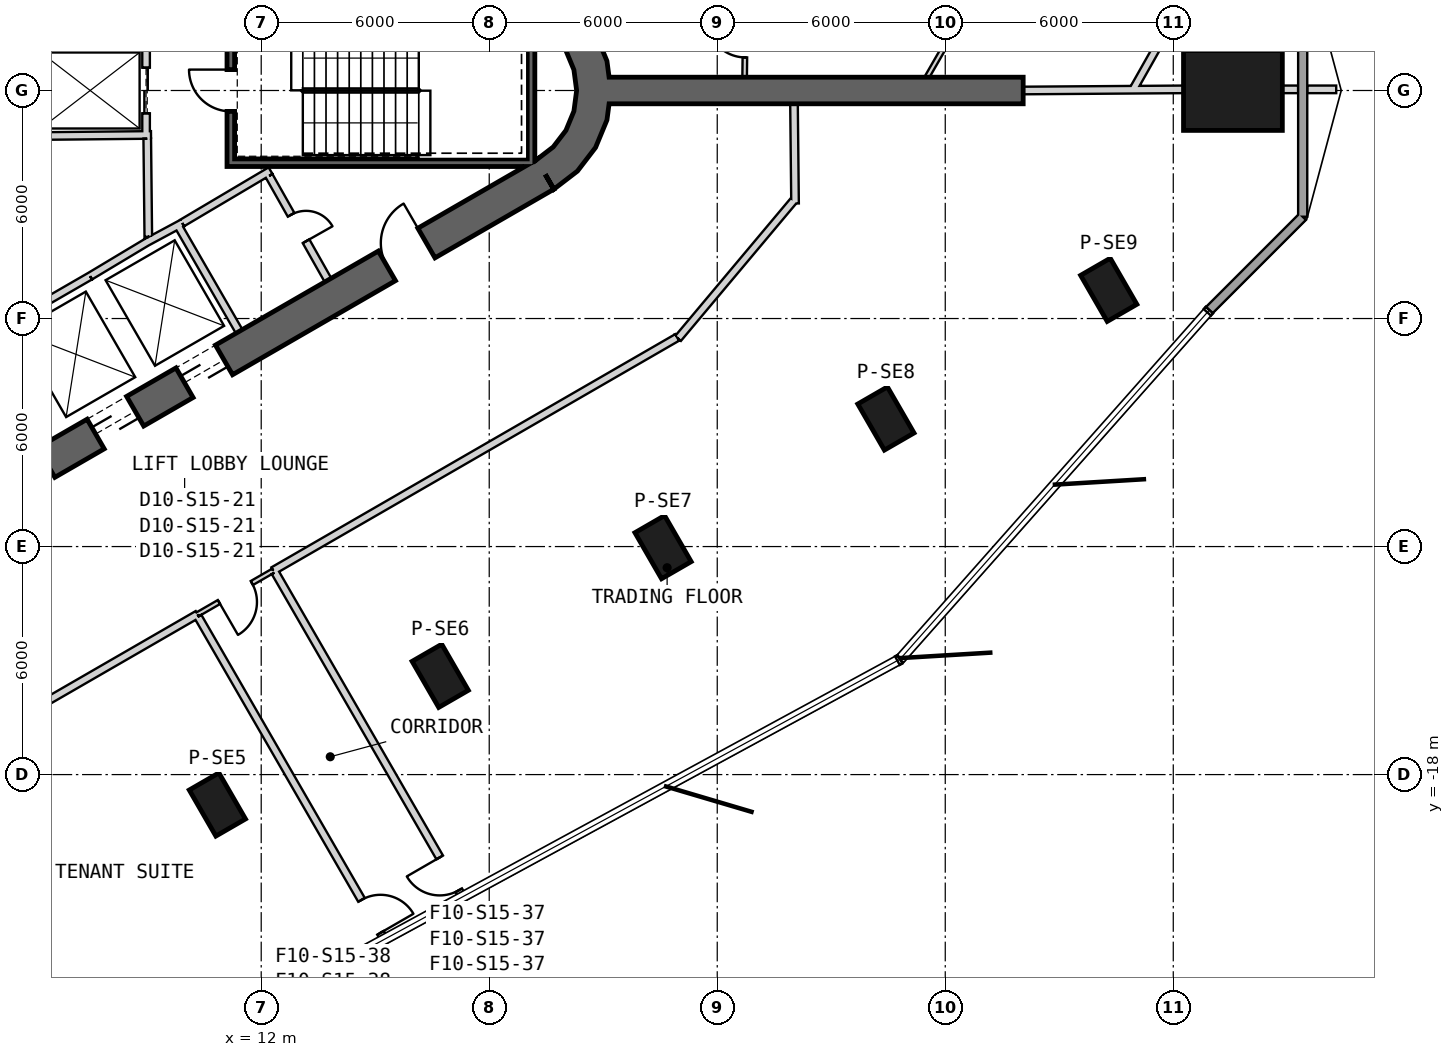
"""IFC4 building model, lengths in metres.
Left out: names, types, materials, properties, quantities, classifications, styles, units other than length and angle.
Written with IfcOpenShell. Run it as: python <this file> out.ifc"""

import sys

from ifc_helpers import new_model, si_unit, direction, frame, frame_2d, origin, origin_2d, place, context, subcontext, project, spatial, polyline, rectangle, outline, extrude, element, fill, save


model = new_model("IFC4")
c1 = context("Model", 3, precision=1e-05, world=origin(), true_north=direction((0.0, 1.0)))
c2 = subcontext(c1, "Body", "Model", "MODEL_VIEW")
j1 = project(units=[si_unit("LENGTHUNIT", "METRE"), si_unit("PLANEANGLEUNIT", "RADIAN")], contexts=[c1])
p1 = place(None, origin())
s1 = spatial("IfcSite", under=j1, at=p1, CompositionType="ELEMENT")
p2 = place(p1, origin())
s2 = spatial("IfcBuilding", under=s1, at=p2, CompositionType="ELEMENT")
p3 = place(p2, frame((0.0, 0.0, 241.2)))
s3 = spatial("IfcBuildingStorey", under=s2, at=p3, CompositionType="ELEMENT", Elevation=241.2)
p4 = place(p3, frame((37.57, 0.0, 0.0), z_axis=(0.0, 0.0, 1.0), x_axis=(1.0, 0.0, 0.0)))
e1 = element("IfcColumn", 1, at=p4, inside=s3, PredefinedType="COLUMN", context=c2, shape_type="SweptSolid", body=[
    extrude(rectangle(XDim=2.6, YDim=2.1, at=origin_2d()), origin(), (0.0, 0.0, 1.0), 4.0),
])
for number, where, z_axis, x_axis in (
    (2, (10.847, -18.787, 0.0), (0.0, 0.0, 1.0), (0.5, -0.866, 0.0)),
    (3, (16.71, -15.401, 0.0), (0.0, 0.0, 1.0), (0.5, -0.866, 0.0)),
    (4, (22.574, -12.016, 0.0), (0.0, 0.0, 1.0), (0.5, -0.866, 0.0)),
    (5, (28.438, -8.631, 0.0), (0.0, 0.0, 1.0), (0.5, -0.866, 0.0)),
    (6, (34.302, -5.245, 0.0), (0.0, 0.0, 1.0), (0.5, -0.866, 0.0)),
):
    element("IfcColumn", number, at=place(p3, frame(where, z_axis=z_axis, x_axis=x_axis)), inside=s3, PredefinedType="COLUMN", context=c2, shape_type="SweptSolid", body=[
        extrude(rectangle(XDim=1.4, YDim=0.9, at=origin_2d()), origin(), (0.0, 0.0, 1.0), 4.0),
    ])
p5 = place(p3, frame((-7.825, -17.97, 0.0), z_axis=(0.0, 0.0, 1.0), x_axis=(0.866028369851, 0.499994862586, 0.0)))
e7 = element("IfcWall", 7, at=p5, inside=s3, PredefinedType="SHEAR", context=c2, shape_type="SweptSolid", body=[
    extrude(rectangle(XDim=31.523, YDim=0.9, at=frame_2d((15.762, 0.0))), origin(), (0.0, 0.0, 1.0), 4.0),
])
p6 = place(p5, frame((7.062, 0.0, 0.0)))
e8 = element("IfcOpeningElement", 8, at=p6, cuts=e7, PredefinedType="OPENING", context=c2, shape_type="SweptSolid", body=[
    extrude(rectangle(XDim=1.2, YDim=2.4, at=frame_2d((0.6, 1.2))), frame((0.0, 0.46, 0.0), z_axis=(0.0, -1.0, 0.0), x_axis=(1.0, 0.0, 0.0)), (0.0, 0.0, 1.0), 0.92),
])
p7 = place(p5, frame((9.762, 0.0, 0.0)))
e9 = element("IfcOpeningElement", 9, at=p7, cuts=e7, PredefinedType="OPENING", context=c2, shape_type="SweptSolid", body=[
    extrude(rectangle(XDim=1.2, YDim=2.4, at=frame_2d((0.6, 1.2))), frame((0.0, 0.46, 0.0), z_axis=(0.0, -1.0, 0.0), x_axis=(1.0, 0.0, 0.0)), (0.0, 0.0, 1.0), 0.92),
])
p8 = place(p5, frame((12.462, 0.0, 0.0)))
e10 = element("IfcOpeningElement", 10, at=p8, cuts=e7, PredefinedType="OPENING", context=c2, shape_type="SweptSolid", body=[
    extrude(rectangle(XDim=1.2, YDim=2.4, at=frame_2d((0.6, 1.2))), frame((0.0, 0.46, 0.0), z_axis=(0.0, -1.0, 0.0), x_axis=(1.0, 0.0, 0.0)), (0.0, 0.0, 1.0), 0.92),
])
p9 = place(p5, frame((15.162, 0.0, 0.0)))
e11 = element("IfcOpeningElement", 11, at=p9, cuts=e7, PredefinedType="OPENING", context=c2, shape_type="SweptSolid", body=[
    extrude(rectangle(XDim=1.2, YDim=2.4, at=frame_2d((0.6, 1.2))), frame((0.0, 0.46, 0.0), z_axis=(0.0, -1.0, 0.0), x_axis=(1.0, 0.0, 0.0)), (0.0, 0.0, 1.0), 0.92),
])
p10 = place(p5, frame((17.862, 0.0, 0.0)))
e12 = element("IfcOpeningElement", 12, at=p10, cuts=e7, PredefinedType="OPENING", context=c2, shape_type="SweptSolid", body=[
    extrude(rectangle(XDim=1.2, YDim=2.4, at=frame_2d((0.6, 1.2))), frame((0.0, 0.46, 0.0), z_axis=(0.0, -1.0, 0.0), x_axis=(1.0, 0.0, 0.0)), (0.0, 0.0, 1.0), 0.92),
])
p11 = place(p5, frame((20.562, 0.0, 0.0)))
e13 = element("IfcOpeningElement", 13, at=p11, cuts=e7, PredefinedType="OPENING", context=c2, shape_type="SweptSolid", body=[
    extrude(rectangle(XDim=1.2, YDim=2.4, at=frame_2d((0.6, 1.2))), frame((0.0, 0.46, 0.0), z_axis=(0.0, -1.0, 0.0), x_axis=(1.0, 0.0, 0.0)), (0.0, 0.0, 1.0), 0.92),
])
p12 = place(p5, frame((26.712, 0.0, 0.0)))
e14 = element("IfcOpeningElement", 14, at=p12, cuts=e7, PredefinedType="OPENING", context=c2, shape_type="SweptSolid", body=[
    extrude(rectangle(XDim=1.2, YDim=2.4, at=frame_2d((0.6, 1.2))), frame((0.0, 0.46, 0.0), z_axis=(0.0, -1.0, 0.0), x_axis=(1.0, 0.0, 0.0)), (0.0, 0.0, 1.0), 0.92),
])
p13 = place(p5, frame((3.612, 0.0, 0.0)))
e15 = element("IfcOpeningElement", 15, at=p13, cuts=e7, PredefinedType="OPENING", context=c2, shape_type="SweptSolid", body=[
    extrude(rectangle(XDim=1.2, YDim=2.4, at=frame_2d((0.6, 1.2))), frame((0.0, 0.46, 0.0), z_axis=(0.0, -1.0, 0.0), x_axis=(1.0, 0.0, 0.0)), (0.0, 0.0, 1.0), 0.92),
])
p14 = place(p3, origin())
e16 = element("IfcWall", 16, at=p14, inside=s3, PredefinedType="SHEAR", context=c2, shape_type="SweptSolid", body=[
    extrude(outline(polyline([(19.7, -2.598), (20.321, -2.121), (20.798, -1.5), (21.098, -0.777), (21.2, 0.0), (21.098, 0.777), (20.798, 1.5), (20.321, 2.121), (19.7, 2.598), (19.25, 1.819), (19.685, 1.485), (20.019, 1.05), (20.229, 0.543), (20.3, 0.0), (20.229, -0.543), (20.019, -1.05), (19.685, -1.485), (19.25, -1.819), (19.7, -2.598)])), origin(), (0.0, 0.0, 1.0), 4.0),
])
p15 = place(p3, frame((21.15, 0.0, 0.0), z_axis=(0.0, 0.0, 1.0), x_axis=(1.0, 0.0, 0.0)))
e17 = element("IfcWall", 17, at=p15, inside=s3, PredefinedType="SHEAR", context=c2, shape_type="SweptSolid", body=[
    extrude(rectangle(XDim=10.9, YDim=0.7, at=frame_2d((5.45, 0.0))), origin(), (0.0, 0.0, 1.0), 4.0),
])
p16 = place(p3, frame((36.949, -5.778, 0.0), z_axis=(0.0, 0.0, 1.0), x_axis=(0.707141916054, 0.707071644573, 0.0)))
e18 = element("IfcWall", 18, at=p16, inside=s3, PredefinedType="SOLIDWALL", context=c2, shape_type="SweptSolid", body=[
    extrude(rectangle(XDim=3.474, YDim=0.24, at=frame_2d((1.737, 0.0))), origin(), (0.0, 0.0, 1.0), 3.7),
])
p17 = place(p3, frame((39.406, -3.321, 0.0), z_axis=(0.0, 0.0, 1.0), x_axis=(0.0, 1.0, 0.0)))
e19 = element("IfcWall", 19, at=p17, inside=s3, PredefinedType="SOLIDWALL", context=c2, shape_type="SweptSolid", body=[
    extrude(rectangle(XDim=6.643, YDim=0.24, at=frame_2d((3.321, 0.0))), origin(), (0.0, 0.0, 1.0), 3.7),
])
p18 = place(p3, frame((0.483, -8.936, 0.0), z_axis=(0.0, 0.0, 1.0), x_axis=(0.866030989016, 0.499990325971, 0.0)))
e20 = element("IfcWall", 20, at=p18, inside=s3, PredefinedType="PLUMBINGWALL", context=c2, shape_type="SweptSolid", body=[
    extrude(rectangle(XDim=8.1, YDim=0.2, at=frame_2d((4.05, 0.0))), origin(), (0.0, 0.0, 1.0), 3.7),
])
p19 = place(p3, frame((9.795, -3.525, 0.0), z_axis=(0.0, 0.0, 1.0), x_axis=(0.499984717929, -0.866034226713, 0.0)))
e21 = element("IfcWall", 21, at=p19, inside=s3, PredefinedType="PLUMBINGWALL", context=c2, shape_type="SweptSolid", body=[
    extrude(rectangle(XDim=3.25, YDim=0.2, at=frame_2d((1.625, 0.0))), origin(), (0.0, 0.0, 1.0), 3.7),
])
p20 = place(p3, frame((8.974, -3.999, 0.0), z_axis=(0.0, 0.0, 1.0), x_axis=(0.880907015104, 0.473289373154, 0.0)))
e22 = element("IfcWall", 22, at=p20, inside=s3, PredefinedType="PLUMBINGWALL", context=c2, shape_type="SweptSolid", body=[
    extrude(rectangle(XDim=1.078, YDim=0.2, at=frame_2d((0.539, 0.0))), origin(), (0.0, 0.0, 1.0), 3.7),
])
p21 = place(p3, frame((7.497, -4.886, 0.0), z_axis=(0.0, 0.0, 1.0), x_axis=(0.857516281273, 0.51445682749, 0.0)))
e23 = element("IfcWall", 23, at=p21, inside=s3, PredefinedType="PLUMBINGWALL", context=c2, shape_type="SweptSolid", body=[
    extrude(rectangle(XDim=1.845, YDim=0.2, at=frame_2d((0.922, 0.0))), origin(), (0.0, 0.0, 1.0), 3.7),
])
p22 = place(p3, frame((19.1, -2.0, -0.3), z_axis=(0.0, 0.0, 1.0), x_axis=(0.0, 1.0, 0.0)))
e24 = element("IfcWall", 24, at=p22, inside=s3, PredefinedType="SHEAR", context=c2, shape_type="SweptSolid", body=[
    extrude(rectangle(XDim=3.8, YDim=0.2, at=frame_2d((1.9, 0.0))), origin(), (0.0, 0.0, 1.0), 4.0),
])
p23 = place(p3, frame((11.1, -1.9, -0.3), z_axis=(0.0, 0.0, 1.0), x_axis=(1.0, 0.0, 0.0)))
e25 = element("IfcWall", 25, at=p23, inside=s3, PredefinedType="SHEAR", context=c2, shape_type="SweptSolid", body=[
    extrude(rectangle(XDim=7.9, YDim=0.2, at=frame_2d((3.95, 0.0))), origin(), (0.0, 0.0, 1.0), 4.0),
])
p24 = place(p3, frame((11.2, -1.8, -0.3), z_axis=(0.0, 0.0, 1.0), x_axis=(0.0, 1.0, 0.0)))
e26 = element("IfcWall", 26, at=p24, inside=s3, PredefinedType="SHEAR", context=c2, shape_type="SweptSolid", body=[
    extrude(rectangle(XDim=3.6, YDim=0.2, at=frame_2d((1.8, 0.0))), origin(), (0.0, 0.0, 1.0), 4.0),
])
p25 = place(p24, frame((1.25, 0.0, 0.3)))
e27 = element("IfcOpeningElement", 27, at=p25, cuts=e26, PredefinedType="OPENING", context=c2, shape_type="SweptSolid", body=[
    extrude(rectangle(XDim=1.1, YDim=2.1, at=frame_2d((0.55, 1.05))), frame((0.0, 0.11, 0.0), z_axis=(0.0, -1.0, 0.0), x_axis=(1.0, 0.0, 0.0)), (0.0, 0.0, 1.0), 0.22),
])
p26 = place(p3, frame((8.97, 1.2, 0.0), z_axis=(0.0, 0.0, 1.0), x_axis=(0.0, -1.0, 0.0)))
e28 = element("IfcWall", 28, at=p26, inside=s3, PredefinedType="PLUMBINGWALL", context=c2, shape_type="SweptSolid", body=[
    extrude(rectangle(XDim=2.4, YDim=0.2, at=frame_2d((1.2, 0.0))), origin(), (0.0, 0.0, 1.0), 3.7),
])
p27 = place(p26, frame((0.6, 0.0, 0.0)))
e29 = element("IfcOpeningElement", 29, at=p27, cuts=e28, PredefinedType="OPENING", context=c2, shape_type="SweptSolid", body=[
    extrude(rectangle(XDim=1.2, YDim=2.4, at=frame_2d((0.6, 1.2))), frame((0.0, 0.11, 0.0), z_axis=(0.0, -1.0, 0.0), x_axis=(1.0, 0.0, 0.0)), (0.0, 0.0, 1.0), 0.22),
])
p28 = place(p3, frame((9.1, -1.169, 0.0), z_axis=(0.0, 0.0, 1.0), x_axis=(-0.999949988, -0.010001074852, 0.0)))
e30 = element("IfcWall", 30, at=p28, inside=s3, PredefinedType="PLUMBINGWALL", context=c2, shape_type="SweptSolid", body=[
    extrude(rectangle(XDim=3.1, YDim=0.2, at=frame_2d((1.55, 0.0))), origin(), (0.0, 0.0, 1.0), 3.7),
])
p29 = place(p3, frame((12.245, -2.109, 0.0), z_axis=(0.0, 0.0, 1.0), x_axis=(-0.860414880418, -0.509594185166, 0.0)))
e31 = element("IfcWall", 31, at=p29, inside=s3, PredefinedType="PARTITIONING", context=c2, shape_type="SweptSolid", body=[
    extrude(rectangle(XDim=2.7, YDim=0.2, at=frame_2d((1.35, 0.0))), origin(), (0.0, 0.0, 1.0), 3.7),
])
p30 = place(p3, frame((13.758, -4.99, 0.0), z_axis=(0.0, 0.0, 1.0), x_axis=(-0.491993409184, 0.87059892334, 0.0)))
e32 = element("IfcWall", 32, at=p30, inside=s3, PredefinedType="PARTITIONING", context=c2, shape_type="SweptSolid", body=[
    extrude(rectangle(XDim=3.15, YDim=0.2, at=frame_2d((1.575, 0.0))), origin(), (0.0, 0.0, 1.0), 3.7),
])
p31 = place(p30, frame((1.175, 0.0, 0.0)))
e33 = element("IfcOpeningElement", 33, at=p31, cuts=e32, PredefinedType="OPENING", context=c2, shape_type="SweptSolid", body=[
    extrude(rectangle(XDim=0.8, YDim=2.1, at=frame_2d((0.4, 1.05))), frame((0.0, 0.11, 0.0), z_axis=(0.0, -1.0, 0.0), x_axis=(1.0, 0.0, 0.0)), (0.0, 0.0, 1.0), 0.22),
])
p32 = place(p3, frame((9.029, -3.851, 0.0), z_axis=(0.0, 0.0, 1.0), x_axis=(-0.010784614026, 0.999941844359, 0.0)))
e34 = element("IfcWall", 34, at=p32, inside=s3, PredefinedType="PARTITIONING", context=c2, shape_type="SweptSolid", body=[
    extrude(rectangle(XDim=2.581, YDim=0.2, at=frame_2d((1.291, 0.0))), origin(), (0.0, 0.0, 1.0), 3.7),
])
p33 = place(p3, frame((24.721, 0.35, 0.0), z_axis=(0.0, 0.0, 1.0), x_axis=(0.012579203405, 0.999920878691, 0.0)))
e35 = element("IfcWall", 35, at=p33, inside=s3, PredefinedType="PARTITIONING", context=c2, shape_type="SweptSolid", body=[
    extrude(rectangle(XDim=1.941, YDim=0.12, at=frame_2d((0.97, 0.0))), origin(), (0.0, 0.0, 1.0), 3.7),
])
p34 = place(p33, frame((0.521, 0.0, 0.0)))
e36 = element("IfcOpeningElement", 36, at=p34, cuts=e35, PredefinedType="OPENING", context=c2, shape_type="SweptSolid", body=[
    extrude(rectangle(XDim=1.0, YDim=2.1, at=frame_2d((0.5, 1.05))), frame((0.0, 0.07, 0.0), z_axis=(0.0, -1.0, 0.0), x_axis=(1.0, 0.0, 0.0)), (0.0, 0.0, 1.0), 0.14),
])
p35 = place(p3, frame((12.317, -12.634, 0.0), z_axis=(0.0, 0.0, 1.0), x_axis=(-0.86602648383, -0.499998129301, 0.0)))
e37 = element("IfcWall", 37, at=p35, inside=s3, PredefinedType="PARTITIONING", context=c2, shape_type="SweptSolid", body=[
    extrude(rectangle(XDim=2.3, YDim=0.12, at=frame_2d((1.15, 0.0))), origin(), (0.0, 0.0, 1.0), 3.7),
])
p36 = place(p35, frame((0.65, 0.0, 0.0)))
e38 = element("IfcOpeningElement", 38, at=p36, cuts=e37, PredefinedType="OPENING", context=c2, shape_type="SweptSolid", body=[
    extrude(rectangle(XDim=1.0, YDim=2.1, at=frame_2d((0.5, 1.05))), frame((0.0, 0.07, 0.0), z_axis=(0.0, -1.0, 0.0), x_axis=(1.0, 0.0, 0.0)), (0.0, 0.0, 1.0), 0.14),
])
p37 = place(p3, frame((26.047, -2.972, 0.0), z_axis=(0.0, 0.0, 1.0), x_axis=(-0.010519853563, 0.99994466481, 0.0)))
e39 = element("IfcWall", 39, at=p37, inside=s3, PredefinedType="PARTITIONING", context=c2, shape_type="SweptSolid", body=[
    extrude(rectangle(XDim=2.623, YDim=0.2, at=frame_2d((1.311, 0.0))), origin(), (0.0, 0.0, 1.0), 3.7),
])
p38 = place(p3, frame((22.968, -6.524, 0.0), z_axis=(0.0, 0.0, 1.0), x_axis=(0.642764400317, 0.766063917493, 0.0)))
e40 = element("IfcWall", 40, at=p38, inside=s3, PredefinedType="PARTITIONING", context=c2, shape_type="SweptSolid", body=[
    extrude(rectangle(XDim=4.74, YDim=0.2, at=frame_2d((2.37, 0.0))), origin(), (0.0, 0.0, 1.0), 2.88),
])
p39 = place(p3, frame((-0.223, -19.874, 0.0), z_axis=(0.0, 0.0, 1.0), x_axis=(0.866025366729, 0.500000064182, 0.0)))
e41 = element("IfcWall", 41, at=p39, inside=s3, PredefinedType="PARTITIONING", context=c2, shape_type="SweptSolid", body=[
    extrude(rectangle(XDim=12.18, YDim=0.2, at=frame_2d((6.09, 0.0))), origin(), (0.0, 0.0, 1.0), 3.07),
])
p40 = place(p3, frame((12.317, -12.634, 0.0), z_axis=(0.0, 0.0, 1.0), x_axis=(0.866028561818, 0.499994530085, 0.0)))
e42 = element("IfcWall", 42, at=p40, inside=s3, PredefinedType="PARTITIONING", context=c2, shape_type="SweptSolid", body=[
    extrude(rectangle(XDim=12.273, YDim=0.2, at=frame_2d((6.136, 0.0))), origin(), (0.0, 0.0, 1.0), 2.98),
])
p41 = place(p3, frame((40.288, 0.03, 0.0), z_axis=(0.0, 0.0, 1.0), x_axis=(-1.0, 0.0, 0.0)))
e43 = element("IfcWall", 43, at=p41, inside=s3, PredefinedType="PARTITIONING", context=c2, shape_type="SweptSolid", body=[
    extrude(rectangle(XDim=0.762, YDim=0.2, at=frame_2d((0.381, 0.0))), origin(), (0.0, 0.0, 1.0), 3.7),
])
p42 = place(p3, frame((39.286, 0.03, 0.0), z_axis=(0.0, 0.0, 1.0), x_axis=(-1.0, 0.0, 0.0)))
e44 = element("IfcWall", 44, at=p42, inside=s3, PredefinedType="PARTITIONING", context=c2, shape_type="SweptSolid", body=[
    extrude(rectangle(XDim=0.416, YDim=0.2, at=frame_2d((0.208, 0.0))), origin(), (0.0, 0.0, 1.0), 3.7),
])
p43 = place(p3, frame((36.27, 0.03, 0.0), z_axis=(0.0, 0.0, 1.0), x_axis=(-0.999974676399, -0.007116639773, 0.0)))
e45 = element("IfcWall", 45, at=p43, inside=s3, PredefinedType="PARTITIONING", context=c2, shape_type="SweptSolid", body=[
    extrude(rectangle(XDim=4.219, YDim=0.2, at=frame_2d((2.11, 0.0))), origin(), (0.0, 0.0, 1.0), 3.27),
])
p44 = place(p3, frame((34.93, 0.0, 0.0), z_axis=(0.0, 0.0, 1.0), x_axis=(0.49225689493, 0.870449969495, 0.0)))
e46 = element("IfcWall", 46, at=p44, inside=s3, PredefinedType="PARTITIONING", context=c2, shape_type="SweptSolid", body=[
    extrude(rectangle(XDim=3.465, YDim=0.2, at=frame_2d((1.733, 0.0))), origin(), (0.0, 0.0, 1.0), 3.27),
])
p45 = place(p3, frame((17.297, -21.219, 0.0), z_axis=(0.0, 0.0, 1.0), x_axis=(-0.500009542791, 0.866019894181, 0.0)))
e47 = element("IfcWall", 47, at=p45, inside=s3, PredefinedType="PARTITIONING", context=c2, shape_type="SweptSolid", body=[
    extrude(rectangle(XDim=9.864, YDim=0.2, at=frame_2d((4.932, 0.0))), origin(), (0.0, 0.0, 1.0), 3.7),
])
p46 = place(p45, frame((0.2, 0.0, 0.0)))
e48 = element("IfcOpeningElement", 48, at=p46, cuts=e47, PredefinedType="OPENING", context=c2, shape_type="SweptSolid", body=[
    extrude(rectangle(XDim=1.0, YDim=2.1, at=frame_2d((0.5, 1.05))), frame((0.0, 0.11, 0.0), z_axis=(0.0, -1.0, 0.0), x_axis=(1.0, 0.0, 0.0)), (0.0, 0.0, 1.0), 0.22),
])
p47 = place(p3, frame((10.338, -13.846, 0.0), z_axis=(0.0, 0.0, 1.0), x_axis=(0.499993357938, -0.866029238547, 0.0)))
e49 = element("IfcWall", 49, at=p47, inside=s3, PredefinedType="PARTITIONING", context=c2, shape_type="SweptSolid", body=[
    extrude(rectangle(XDim=9.803, YDim=0.2, at=frame_2d((4.902, 0.0))), origin(), (0.0, 0.0, 1.0), 3.7),
])
p48 = place(p47, frame((8.604, 0.0, 0.0)))
e50 = element("IfcOpeningElement", 50, at=p48, cuts=e49, PredefinedType="OPENING", context=c2, shape_type="SweptSolid", body=[
    extrude(rectangle(XDim=1.0, YDim=2.1, at=frame_2d((0.5, 1.05))), frame((0.0, 0.11, 0.0), z_axis=(0.0, -1.0, 0.0), x_axis=(1.0, 0.0, 0.0)), (0.0, 0.0, 1.0), 0.22),
])
p49 = place(p3, frame((29.518, 0.35, 0.0), z_axis=(0.0, 0.0, 1.0), x_axis=(0.499424120211, 0.866357632939, 0.0)))
e51 = element("IfcWall", 51, at=p49, inside=s3, PredefinedType="PARTITIONING", context=c2, shape_type="SweptSolid", body=[
    extrude(rectangle(XDim=5.668, YDim=0.12, at=frame_2d((2.834, 0.0))), origin(), (0.0, 0.0, 1.0), 2.88),
])
p50 = place(p25, origin())
e52 = element("IfcDoor", 52, at=p50, inside=s3, OperationType="SINGLE_SWING_RIGHT", PredefinedType="USERDEFINED", context=c2, shape_type="SweptSolid", body=[
    extrude(rectangle(XDim=1.1, YDim=2.1, at=frame_2d((0.55, 1.05))), frame((0.0, 0.025, 0.0), z_axis=(0.0, -1.0, 0.0), x_axis=(1.0, 0.0, 0.0)), (0.0, 0.0, 1.0), 0.05),
])
fill(e27, e52)
p51 = place(p27, origin())
e53 = element("IfcDoor", 53, at=p51, inside=s3, OperationType="SLIDING_TO_LEFT", PredefinedType="USERDEFINED", context=c2, shape_type="SweptSolid", body=[
    extrude(rectangle(XDim=1.2, YDim=2.4, at=frame_2d((0.6, 1.2))), frame((0.0, 0.025, 0.0), z_axis=(0.0, -1.0, 0.0), x_axis=(1.0, 0.0, 0.0)), (0.0, 0.0, 1.0), 0.05),
])
fill(e29, e53)
p52 = place(p31, origin())
e54 = element("IfcDoor", 54, at=p52, inside=s3, OperationType="SINGLE_SWING_RIGHT", PredefinedType="USERDEFINED", context=c2, shape_type="SweptSolid", body=[
    extrude(rectangle(XDim=0.8, YDim=2.1, at=frame_2d((0.4, 1.05))), frame((0.0, 0.025, 0.0), z_axis=(0.0, -1.0, 0.0), x_axis=(1.0, 0.0, 0.0)), (0.0, 0.0, 1.0), 0.05),
])
fill(e33, e54)
p53 = place(p36, origin())
e55 = element("IfcDoor", 55, at=p53, inside=s3, OperationType="SINGLE_SWING_RIGHT", PredefinedType="NOTDEFINED", context=c2, shape_type="SweptSolid", body=[
    extrude(rectangle(XDim=1.0, YDim=2.1, at=frame_2d((0.5, 1.05))), frame((0.0, 0.025, 0.0), z_axis=(0.0, -1.0, 0.0), x_axis=(1.0, 0.0, 0.0)), (0.0, 0.0, 1.0), 0.05),
])
fill(e38, e55)
p54 = place(p34, origin())
e56 = element("IfcDoor", 56, at=p54, inside=s3, OperationType="SINGLE_SWING_RIGHT", PredefinedType="NOTDEFINED", context=c2, shape_type="SweptSolid", body=[
    extrude(rectangle(XDim=1.0, YDim=2.1, at=frame_2d((0.5, 1.05))), frame((0.0, 0.025, 0.0), z_axis=(0.0, -1.0, 0.0), x_axis=(1.0, 0.0, 0.0)), (0.0, 0.0, 1.0), 0.05),
])
fill(e36, e56)
p55 = place(p46, origin())
e57 = element("IfcDoor", 57, at=p55, inside=s3, OperationType="SINGLE_SWING_LEFT", PredefinedType="USERDEFINED", context=c2, shape_type="SweptSolid", body=[
    extrude(rectangle(XDim=1.0, YDim=2.1, at=frame_2d((0.5, 1.05))), frame((0.0, 0.025, 0.0), z_axis=(0.0, -1.0, 0.0), x_axis=(1.0, 0.0, 0.0)), (0.0, 0.0, 1.0), 0.05),
])
fill(e48, e57)
p56 = place(p48, origin())
e58 = element("IfcDoor", 58, at=p56, inside=s3, OperationType="SINGLE_SWING_LEFT", PredefinedType="USERDEFINED", context=c2, shape_type="SweptSolid", body=[
    extrude(rectangle(XDim=1.0, YDim=2.1, at=frame_2d((0.5, 1.05))), frame((0.0, 0.025, 0.0), z_axis=(0.0, -1.0, 0.0), x_axis=(1.0, 0.0, 0.0)), (0.0, 0.0, 1.0), 0.05),
])
fill(e50, e58)
p57 = place(p10, origin())
e59 = element("IfcDoor", 59, at=p57, inside=s3, OperationType="SLIDING_TO_LEFT", PredefinedType="USERDEFINED", context=c2, shape_type="SweptSolid", body=[
    extrude(rectangle(XDim=1.2, YDim=2.4, at=frame_2d((0.6, 1.2))), frame((0.0, 0.025, 0.0), z_axis=(0.0, -1.0, 0.0), x_axis=(1.0, 0.0, 0.0)), (0.0, 0.0, 1.0), 0.05),
])
fill(e12, e59)
p58 = place(p11, origin())
e60 = element("IfcDoor", 60, at=p58, inside=s3, OperationType="SLIDING_TO_LEFT", PredefinedType="USERDEFINED", context=c2, shape_type="SweptSolid", body=[
    extrude(rectangle(XDim=1.2, YDim=2.4, at=frame_2d((0.6, 1.2))), frame((0.0, 0.025, 0.0), z_axis=(0.0, -1.0, 0.0), x_axis=(1.0, 0.0, 0.0)), (0.0, 0.0, 1.0), 0.05),
])
fill(e13, e60)
p59 = place(p12, origin())
e61 = element("IfcDoor", 61, at=p59, inside=s3, OperationType="SINGLE_SWING_LEFT", PredefinedType="USERDEFINED", context=c2, shape_type="SweptSolid", body=[
    extrude(rectangle(XDim=1.2, YDim=2.4, at=frame_2d((0.6, 1.2))), frame((0.0, 0.025, 0.0), z_axis=(0.0, -1.0, 0.0), x_axis=(1.0, 0.0, 0.0)), (0.0, 0.0, 1.0), 0.05),
])
fill(e14, e61)
save(model, sys.argv[1])
